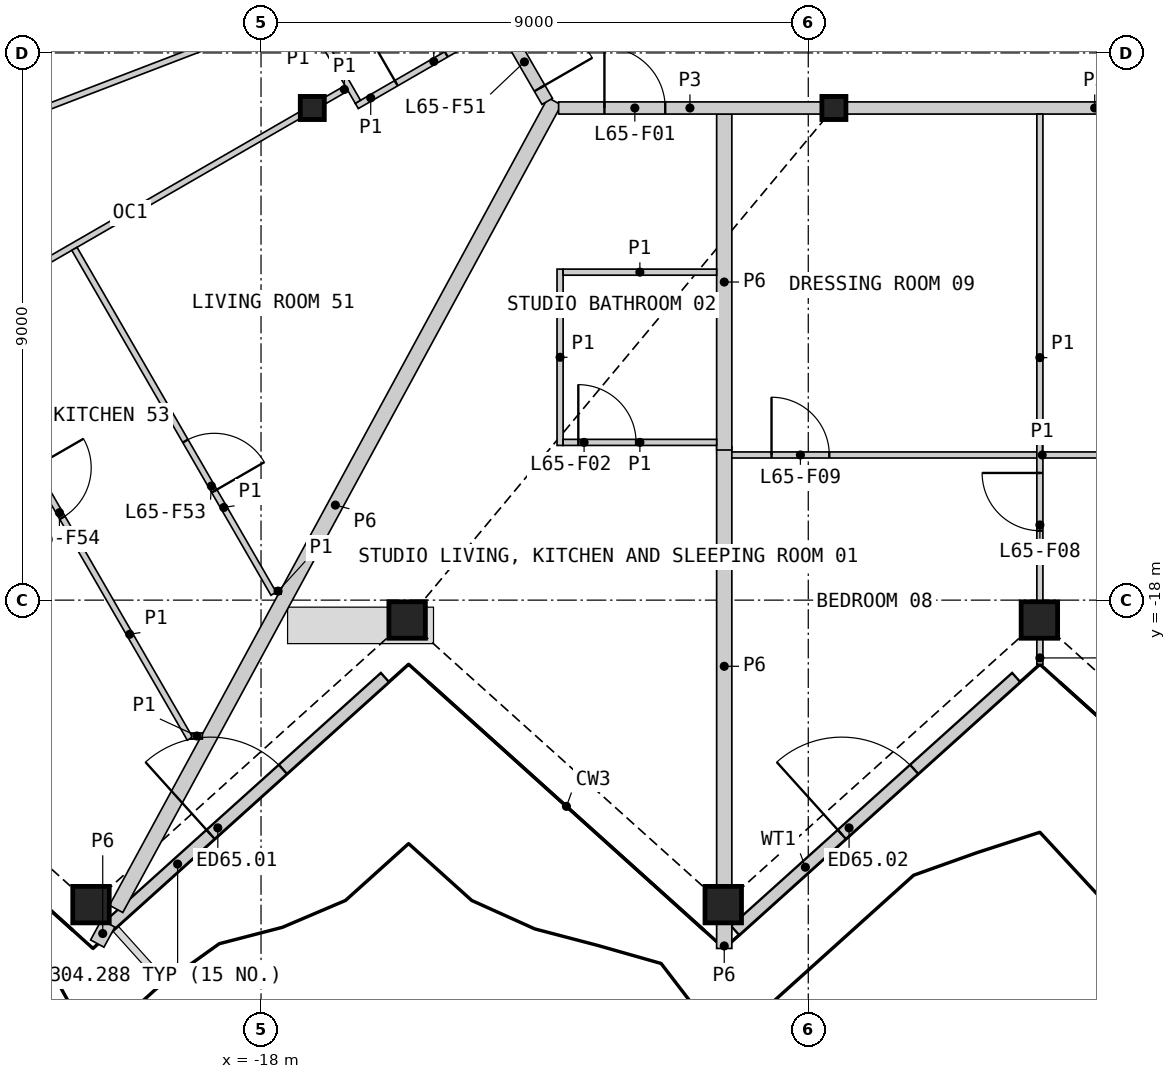
"""IFC4 building model, lengths in metres.
Left out: names, types, materials, properties, quantities, classifications, styles, units other than length and angle.
Written with IfcOpenShell. Run it as: python <this file> out.ifc"""

import sys

from ifc_helpers import new_model, si_unit, direction, frame, frame_2d, origin, origin_2d, place, context, subcontext, project, spatial, rectangle, hollow_rectangle, i_section, extrude, element, fill, save


model = new_model("IFC4")
c1 = context("Model", 3, precision=1e-05, world=origin(), true_north=direction((0.0, 1.0)))
c2 = subcontext(c1, "Body", "Model", "MODEL_VIEW")
j1 = project(units=[si_unit("LENGTHUNIT", "METRE"), si_unit("PLANEANGLEUNIT", "RADIAN")], contexts=[c1])
p1 = place(None, origin())
s1 = spatial("IfcSite", under=j1, at=p1, CompositionType="ELEMENT")
p2 = place(p1, origin())
s2 = spatial("IfcBuilding", under=s1, at=p2, CompositionType="ELEMENT")
p3 = place(p2, frame((0.0, 0.0, 301.8)))
s3 = spatial("IfcBuildingStorey", under=s2, at=p3, CompositionType="ELEMENT", Elevation=301.8)
for number, where, z_axis, x_axis in (
    (1, (-20.796, -23.008, 0.0), (0.0, 0.0, 1.0), (1.0, 0.0, 0.0)),
    (2, (-15.597, -18.327, 0.0), (0.0, 0.0, 1.0), (1.0, 0.0, 0.0)),
    (3, (-10.398, -23.008, 0.0), (0.0, 0.0, 1.0), (1.0, 0.0, 0.0)),
    (4, (-5.199, -18.327, 0.0), (0.0, 0.0, 1.0), (1.0, 0.0, 0.0)),
):
    element("IfcColumn", number, at=place(p3, frame(where, z_axis=z_axis, x_axis=x_axis)), inside=s3, PredefinedType="COLUMN", context=c2, shape_type="SweptSolid", body=[
        extrude(hollow_rectangle(XDim=0.6, YDim=0.6, WallThickness=0.04, at=origin_2d()), origin(), (0.0, 0.0, 1.0), 3.4),
    ])
for number, where, z_axis, x_axis in (
    (5, (-17.157, -9.906, 0.0), (0.0, 0.0, 1.0), (1.0, 0.0, 0.0)),
    (6, (-8.578, -9.906, 0.0), (0.0, 0.0, 1.0), (1.0, 0.0, 0.0)),
):
    element("IfcColumn", number, at=place(p3, frame(where, z_axis=z_axis, x_axis=x_axis)), inside=s3, PredefinedType="COLUMN", context=c2, shape_type="SweptSolid", body=[
        extrude(i_section(OverallWidth=0.396, OverallDepth=0.381, WebThickness=0.019, FlangeThickness=0.03, at=origin_2d()), origin(), (0.0, 0.0, 1.0), 3.4),
    ])
p4 = place(p3, frame((-20.508, -23.364, 0.0), z_axis=(0.0, 0.0, 1.0), x_axis=(0.743135364919, 0.669141113224, 0.0)))
e7 = element("IfcWall", 7, at=p4, inside=s3, PredefinedType="SOLIDWALL", context=c2, shape_type="SweptSolid", body=[
    extrude(rectangle(XDim=6.117, YDim=0.2, at=frame_2d((3.059, 0.0))), origin(), (0.0, 0.0, 1.0), 2.488),
])
p5 = place(p4, frame((2.259, 0.0, 0.0)))
e8 = element("IfcOpeningElement", 8, at=p5, cuts=e7, PredefinedType="OPENING", context=c2, shape_type="SweptSolid", body=[
    extrude(rectangle(XDim=1.6, YDim=2.25, at=frame_2d((0.8, 1.125))), frame((0.0, 0.11, 0.0), z_axis=(0.0, -1.0, 0.0), x_axis=(1.0, 0.0, 0.0)), (0.0, 0.0, 1.0), 0.22),
])
p6 = place(p3, frame((-10.203, -23.434, 0.0), z_axis=(0.0, 0.0, 1.0), x_axis=(0.74314582041, 0.669129501373, 0.0)))
e9 = element("IfcWall", 9, at=p6, inside=s3, PredefinedType="SOLIDWALL", context=c2, shape_type="SweptSolid", body=[
    extrude(rectangle(XDim=6.221, YDim=0.2, at=frame_2d((3.11, 0.0))), origin(), (0.0, 0.0, 1.0), 2.488),
])
p7 = place(p6, frame((2.362, 0.0, 0.0)))
e10 = element("IfcOpeningElement", 10, at=p7, cuts=e9, PredefinedType="OPENING", context=c2, shape_type="SweptSolid", body=[
    extrude(rectangle(XDim=1.6, YDim=2.25, at=frame_2d((0.8, 1.125))), frame((0.0, 0.11, 0.0), z_axis=(0.0, -1.0, 0.0), x_axis=(1.0, 0.0, 0.0)), (0.0, 0.0, 1.0), 0.22),
])
p8 = place(p3, frame((-20.383, -23.078, 0.0), z_axis=(0.0, 0.0, 1.0), x_axis=(0.477177412766, 0.878806984921, 0.0)))
e11 = element("IfcWall", 11, at=p8, inside=s3, PredefinedType="PARTITIONING", context=c2, shape_type="SweptSolid", body=[
    extrude(rectangle(XDim=15.114, YDim=0.25, at=frame_2d((7.557, 0.0))), origin(), (0.0, 0.0, 1.0), 2.33),
])
p9 = place(p3, frame((-8.371, -9.906, 0.0), z_axis=(0.0, 0.0, 1.0), x_axis=(1.0, 0.0, 0.0)))
e12 = element("IfcWall", 12, at=p9, inside=s3, PredefinedType="PARTITIONING", context=c2, shape_type="SweptSolid", body=[
    extrude(rectangle(XDim=8.163, YDim=0.2, at=frame_2d((4.082, 0.0))), origin(), (0.0, 0.0, 1.0), 3.1),
])
p10 = place(p3, frame((-10.382, -22.698, 0.0), z_axis=(0.0, 0.0, 1.0), x_axis=(0.0, 1.0, 0.0)))
e13 = element("IfcWall", 13, at=p10, inside=s3, PredefinedType="PARTITIONING", context=c2, shape_type="SweptSolid", body=[
    extrude(rectangle(XDim=7.22, YDim=0.25, at=frame_2d((3.61, 0.0))), origin(), (0.0, 0.0, 1.0), 2.33),
])
p11 = place(p3, frame((-10.382, -15.531, 0.0), z_axis=(0.0, 0.0, 1.0), x_axis=(0.0, 1.0, 0.0)))
e14 = element("IfcWall", 14, at=p11, inside=s3, PredefinedType="PARTITIONING", context=c2, shape_type="SweptSolid", body=[
    extrude(rectangle(XDim=5.525, YDim=0.25, at=frame_2d((2.762, 0.0))), origin(), (0.0, 0.0, 1.0), 2.33),
])
p12 = place(p3, frame((-13.106, -9.906, 0.0), z_axis=(0.0, 0.0, 1.0), x_axis=(1.0, 0.0, 0.0)))
e15 = element("IfcWall", 15, at=p12, inside=s3, PredefinedType="PARTITIONING", context=c2, shape_type="SweptSolid", body=[
    extrude(rectangle(XDim=4.32, YDim=0.2, at=frame_2d((2.16, 0.0))), origin(), (0.0, 0.0, 1.0), 3.1),
])
p13 = place(p12, frame((0.753, 0.0, 0.0)))
e16 = element("IfcOpeningElement", 16, at=p13, cuts=e15, PredefinedType="OPENING", context=c2, shape_type="SweptSolid", body=[
    extrude(rectangle(XDim=1.0, YDim=2.1, at=frame_2d((0.5, 1.05))), frame((0.0, 0.11, 0.0), z_axis=(0.0, -1.0, 0.0), x_axis=(1.0, 0.0, 0.0)), (0.0, 0.0, 1.0), 0.22),
])
p14 = place(p3, frame((-15.131, -6.614, 0.0), z_axis=(0.0, 0.0, 1.0), x_axis=(0.499967746641, -0.866044024469, 0.0)))
e17 = element("IfcWall", 17, at=p14, inside=s3, PredefinedType="PARTITIONING", context=c2, shape_type="SweptSolid", body=[
    extrude(rectangle(XDim=3.676, YDim=0.2, at=frame_2d((1.838, 0.0))), origin(), (0.0, 0.0, 1.0), 3.1),
])
p15 = place(p14, frame((2.426, 0.0, 0.0)))
e18 = element("IfcOpeningElement", 18, at=p15, cuts=e17, PredefinedType="OPENING", context=c2, shape_type="SweptSolid", body=[
    extrude(rectangle(XDim=1.0, YDim=2.1, at=frame_2d((0.5, 1.05))), frame((0.0, 0.11, 0.0), z_axis=(0.0, -1.0, 0.0), x_axis=(1.0, 0.0, 0.0)), (0.0, 0.0, 1.0), 0.22),
])
p16 = place(p3, frame((-10.382, -23.729, 0.0), z_axis=(0.0, 0.0, 1.0), x_axis=(0.0, 1.0, 0.0)))
e19 = element("IfcWall", 19, at=p16, inside=s3, PredefinedType="PARTITIONING", context=c2, shape_type="SweptSolid", body=[
    extrude(rectangle(XDim=0.411, YDim=0.25, at=frame_2d((0.206, 0.0))), origin(), (0.0, 0.0, 1.0), 2.33),
])
p17 = place(p3, frame((-20.693, -23.649, 0.0), z_axis=(0.0, 0.0, 1.0), x_axis=(0.477077538769, 0.878861207474, 0.0)))
e20 = element("IfcWall", 20, at=p17, inside=s3, PredefinedType="PARTITIONING", context=c2, shape_type="SweptSolid", body=[
    extrude(rectangle(XDim=0.376, YDim=0.25, at=frame_2d((0.188, 0.0))), origin(), (0.0, 0.0, 1.0), 2.33),
])
p18 = place(p3, frame((-29.479, -12.95, 0.0), z_axis=(0.0, 0.0, 1.0), x_axis=(0.933581523131, 0.358365092703, 0.0)))
e21 = element("IfcWall", 21, at=p18, inside=s3, PredefinedType="PARTITIONING", context=c2, shape_type="SweptSolid", body=[
    extrude(rectangle(XDim=13.005, YDim=0.1, at=frame_2d((6.502, 0.0))), origin(), (0.0, 0.0, 1.0), 2.33),
])
p19 = place(p18, frame((4.771, 0.0, 0.0)))
e22 = element("IfcOpeningElement", 22, at=p19, cuts=e21, PredefinedType="OPENING", context=c2, shape_type="SweptSolid", body=[
    extrude(rectangle(XDim=0.95, YDim=2.1, at=frame_2d((0.475, 1.05))), frame((0.0, 0.06, 0.0), z_axis=(0.0, -1.0, 0.0), x_axis=(1.0, 0.0, 0.0)), (0.0, 0.0, 1.0), 0.12),
])
p20 = place(p3, frame((-27.122, -15.659, 0.0), z_axis=(0.0, 0.0, 1.0), x_axis=(0.866021046153, 0.500007547564, 0.0)))
e23 = element("IfcWall", 23, at=p20, inside=s3, PredefinedType="PARTITIONING", context=c2, shape_type="SweptSolid", body=[
    extrude(rectangle(XDim=11.267, YDim=0.1, at=frame_2d((5.634, 0.0))), origin(), (0.0, 0.0, 1.0), 2.33),
])
p21 = place(p20, frame((1.452, 0.0, 0.0)))
e24 = element("IfcOpeningElement", 24, at=p21, cuts=e23, PredefinedType="OPENING", context=c2, shape_type="SweptSolid", body=[
    extrude(rectangle(XDim=0.95, YDim=2.1, at=frame_2d((0.475, 1.05))), frame((0.0, 0.06, 0.0), z_axis=(0.0, -1.0, 0.0), x_axis=(1.0, 0.0, 0.0)), (0.0, 0.0, 1.0), 0.12),
])
p22 = place(p3, frame((-10.257, -15.613, 0.0), z_axis=(0.0, 0.0, 1.0), x_axis=(1.0, 0.0, 0.0)))
e25 = element("IfcWall", 25, at=p22, inside=s3, PredefinedType="PARTITIONING", context=c2, shape_type="SweptSolid", body=[
    extrude(rectangle(XDim=10.207, YDim=0.1, at=frame_2d((5.104, 0.0))), origin(), (0.0, 0.0, 1.0), 2.33),
])
p23 = place(p22, frame((8.403, 0.0, 0.0)))
e26 = element("IfcOpeningElement", 26, at=p23, cuts=e25, PredefinedType="OPENING", context=c2, shape_type="SweptSolid", body=[
    extrude(rectangle(XDim=0.95, YDim=2.1, at=frame_2d((0.475, 1.05))), frame((0.0, 0.06, 0.0), z_axis=(0.0, -1.0, 0.0), x_axis=(1.0, 0.0, 0.0)), (0.0, 0.0, 1.0), 0.12),
])
p24 = place(p22, frame((0.653, 0.0, 0.0)))
e27 = element("IfcOpeningElement", 27, at=p24, cuts=e25, PredefinedType="OPENING", context=c2, shape_type="SweptSolid", body=[
    extrude(rectangle(XDim=0.95, YDim=2.1, at=frame_2d((0.475, 1.05))), frame((0.0, 0.06, 0.0), z_axis=(0.0, -1.0, 0.0), x_axis=(1.0, 0.0, 0.0)), (0.0, 0.0, 1.0), 0.12),
])
p25 = place(p3, frame((-5.191, -18.017, 0.0), z_axis=(0.0, 0.0, 1.0), x_axis=(0.0, 1.0, 0.0)))
e28 = element("IfcWall", 28, at=p25, inside=s3, PredefinedType="PARTITIONING", context=c2, shape_type="SweptSolid", body=[
    extrude(rectangle(XDim=8.011, YDim=0.1, at=frame_2d((4.006, 0.0))), origin(), (0.0, 0.0, 1.0), 2.33),
])
p26 = place(p25, frame((1.158, 0.0, 0.0)))
e29 = element("IfcOpeningElement", 29, at=p26, cuts=e28, PredefinedType="OPENING", context=c2, shape_type="SweptSolid", body=[
    extrude(rectangle(XDim=0.95, YDim=2.1, at=frame_2d((0.475, 1.05))), frame((0.0, 0.06, 0.0), z_axis=(0.0, -1.0, 0.0), x_axis=(1.0, 0.0, 0.0)), (0.0, 0.0, 1.0), 0.12),
])
p27 = place(p3, frame((-23.133, -13.414, 0.0), z_axis=(0.0, 0.0, 1.0), x_axis=(0.500014841469, -0.866016834889, 0.0)))
e30 = element("IfcWall", 30, at=p27, inside=s3, PredefinedType="PARTITIONING", context=c2, shape_type="SweptSolid", body=[
    extrude(rectangle(XDim=7.927, YDim=0.1, at=frame_2d((3.963, 0.0))), origin(), (0.0, 0.0, 1.0), 2.33),
])
p28 = place(p27, frame((2.78, 0.0, 0.0)))
e31 = element("IfcOpeningElement", 31, at=p28, cuts=e30, PredefinedType="OPENING", context=c2, shape_type="SweptSolid", body=[
    extrude(rectangle(XDim=0.95, YDim=2.1, at=frame_2d((0.475, 1.05))), frame((0.0, 0.06, 0.0), z_axis=(0.0, -1.0, 0.0), x_axis=(1.0, 0.0, 0.0)), (0.0, 0.0, 1.0), 0.12),
])
p29 = place(p3, frame((-21.069, -12.222, 0.0), z_axis=(0.0, 0.0, 1.0), x_axis=(0.499991310556, -0.866030420579, 0.0)))
e32 = element("IfcWall", 32, at=p29, inside=s3, PredefinedType="PARTITIONING", context=c2, shape_type="SweptSolid", body=[
    extrude(rectangle(XDim=6.55, YDim=0.1, at=frame_2d((3.275, 0.0))), origin(), (0.0, 0.0, 1.0), 2.33),
])
p30 = place(p29, frame((3.65, 0.0, 0.0)))
e33 = element("IfcOpeningElement", 33, at=p30, cuts=e32, PredefinedType="OPENING", context=c2, shape_type="SweptSolid", body=[
    extrude(rectangle(XDim=0.95, YDim=2.1, at=frame_2d((0.475, 1.05))), frame((0.0, 0.06, 0.0), z_axis=(0.0, -1.0, 0.0), x_axis=(1.0, 0.0, 0.0)), (0.0, 0.0, 1.0), 0.12),
])
p31 = place(p3, frame((-13.082, -15.456, 0.0), z_axis=(0.0, 0.0, 1.0), x_axis=(0.0, 1.0, 0.0)))
e34 = element("IfcWall", 34, at=p31, inside=s3, PredefinedType="PARTITIONING", context=c2, shape_type="SweptSolid", body=[
    extrude(rectangle(XDim=2.9, YDim=0.1, at=frame_2d((1.45, 0.0))), origin(), (0.0, 0.0, 1.0), 2.33),
])
p32 = place(p3, frame((-16.426, -9.872, 0.0), z_axis=(0.0, 0.0, 1.0), x_axis=(0.866029095148, 0.499993606316, 0.0)))
e35 = element("IfcWall", 35, at=p32, inside=s3, PredefinedType="PARTITIONING", context=c2, shape_type="SweptSolid", body=[
    extrude(rectangle(XDim=2.65, YDim=0.1, at=frame_2d((1.325, 0.0))), origin(), (0.0, 0.0, 1.0), 2.33),
])
p33 = place(p32, frame((0.75, 0.0, 0.0)))
e36 = element("IfcOpeningElement", 36, at=p33, cuts=e35, PredefinedType="OPENING", context=c2, shape_type="SweptSolid", body=[
    extrude(rectangle(XDim=0.95, YDim=2.1, at=frame_2d((0.475, 1.05))), frame((0.0, 0.06, 0.0), z_axis=(0.0, -1.0, 0.0), x_axis=(1.0, 0.0, 0.0)), (0.0, 0.0, 1.0), 0.12),
])
p34 = place(p3, frame((-13.032, -12.606, 0.0), z_axis=(0.0, 0.0, 1.0), x_axis=(1.0, 0.0, 0.0)))
e37 = element("IfcWall", 37, at=p34, inside=s3, PredefinedType="PARTITIONING", context=c2, shape_type="SweptSolid", body=[
    extrude(rectangle(XDim=2.525, YDim=0.1, at=frame_2d((1.263, 0.0))), origin(), (0.0, 0.0, 1.0), 2.33),
])
p35 = place(p3, frame((-13.032, -15.406, 0.0), z_axis=(0.0, 0.0, 1.0), x_axis=(1.0, 0.0, 0.0)))
e38 = element("IfcWall", 38, at=p35, inside=s3, PredefinedType="PARTITIONING", context=c2, shape_type="SweptSolid", body=[
    extrude(rectangle(XDim=2.525, YDim=0.1, at=frame_2d((1.263, 0.0))), origin(), (0.0, 0.0, 1.0), 2.33),
])
p36 = place(p35, frame((0.25, 0.0, 0.0)))
e39 = element("IfcOpeningElement", 39, at=p36, cuts=e38, PredefinedType="OPENING", context=c2, shape_type="SweptSolid", body=[
    extrude(rectangle(XDim=0.95, YDim=2.1, at=frame_2d((0.475, 1.05))), frame((0.0, 0.06, 0.0), z_axis=(0.0, -1.0, 0.0), x_axis=(1.0, 0.0, 0.0)), (0.0, 0.0, 1.0), 0.12),
])
p37 = place(p3, frame((-17.507, -7.899, 0.0), z_axis=(0.0, 0.0, 1.0), x_axis=(0.499946605688, -0.86605622881, 0.0)))
e40 = element("IfcWall", 40, at=p37, inside=s3, PredefinedType="PARTITIONING", context=c2, shape_type="SweptSolid", body=[
    extrude(rectangle(XDim=2.2, YDim=0.1, at=frame_2d((1.1, 0.0))), origin(), (0.0, 0.0, 1.0), 2.33),
])
p38 = place(p3, frame((-16.949, -9.786, 0.0), z_axis=(0.0, 0.0, 1.0), x_axis=(0.866036909293, 0.499980071345, 0.0)))
e41 = element("IfcWall", 41, at=p38, inside=s3, PredefinedType="PARTITIONING", context=c2, shape_type="SweptSolid", body=[
    extrude(rectangle(XDim=0.41, YDim=0.1, at=frame_2d((0.205, 0.0))), origin(), (0.0, 0.0, 1.0), 2.33),
])
p39 = place(p3, frame((-5.191, -19.055, 0.0), z_axis=(0.0, 0.0, 1.0), x_axis=(0.0, 1.0, 0.0)))
e42 = element("IfcWall", 42, at=p39, inside=s3, PredefinedType="PARTITIONING", context=c2, shape_type="SweptSolid", body=[
    extrude(rectangle(XDim=0.418, YDim=0.1, at=frame_2d((0.209, 0.0))), origin(), (0.0, 0.0, 1.0), 2.33),
])
p40 = place(p3, frame((-19.145, -20.235, 0.0), z_axis=(0.0, 0.0, 1.0), x_axis=(1.0, 0.0, 0.0)))
e43 = element("IfcWall", 43, at=p40, inside=s3, PredefinedType="PARTITIONING", context=c2, shape_type="SweptSolid", body=[
    extrude(rectangle(XDim=0.18, YDim=0.1, at=frame_2d((0.09, 0.0))), origin(), (0.0, 0.0, 1.0), 2.33),
])
p41 = place(p3, frame((-17.769, -17.852, 0.0), z_axis=(0.0, 0.0, 1.0), x_axis=(1.0, 0.0, 0.0)))
e44 = element("IfcWall", 44, at=p41, inside=s3, PredefinedType="PARTITIONING", context=c2, shape_type="SweptSolid", body=[
    extrude(rectangle(XDim=0.098, YDim=0.1, at=frame_2d((0.049, 0.0))), origin(), (0.0, 0.0, 1.0), 2.33),
])
p42 = place(p5, origin())
e45 = element("IfcDoor", 45, at=p42, inside=s3, OperationType="DOUBLE_DOOR_SINGLE_SWING", PredefinedType="DOOR", context=c2, shape_type="SweptSolid", body=[
    extrude(rectangle(XDim=1.6, YDim=2.25, at=frame_2d((0.8, 1.125))), frame((0.0, 0.025, 0.0), z_axis=(0.0, -1.0, 0.0), x_axis=(1.0, 0.0, 0.0)), (0.0, 0.0, 1.0), 0.05),
])
fill(e8, e45)
p43 = place(p7, origin())
e46 = element("IfcDoor", 46, at=p43, inside=s3, OperationType="DOUBLE_DOOR_SINGLE_SWING", PredefinedType="DOOR", context=c2, shape_type="SweptSolid", body=[
    extrude(rectangle(XDim=1.6, YDim=2.25, at=frame_2d((0.8, 1.125))), frame((0.0, 0.025, 0.0), z_axis=(0.0, -1.0, 0.0), x_axis=(1.0, 0.0, 0.0)), (0.0, 0.0, 1.0), 0.05),
])
fill(e10, e46)
p44 = place(p13, origin())
e47 = element("IfcDoor", 47, at=p44, inside=s3, OperationType="SINGLE_SWING_LEFT", PredefinedType="DOOR", context=c2, shape_type="SweptSolid", body=[
    extrude(rectangle(XDim=1.0, YDim=2.1, at=frame_2d((0.5, 1.05))), frame((0.0, 0.025, 0.0), z_axis=(0.0, -1.0, 0.0), x_axis=(1.0, 0.0, 0.0)), (0.0, 0.0, 1.0), 0.05),
])
fill(e16, e47)
p45 = place(p36, origin())
e48 = element("IfcDoor", 48, at=p45, inside=s3, OperationType="SINGLE_SWING_LEFT", PredefinedType="DOOR", context=c2, shape_type="SweptSolid", body=[
    extrude(rectangle(XDim=0.95, YDim=2.1, at=frame_2d((0.475, 1.05))), frame((0.0, 0.025, 0.0), z_axis=(0.0, -1.0, 0.0), x_axis=(1.0, 0.0, 0.0)), (0.0, 0.0, 1.0), 0.05),
])
fill(e39, e48)
p46 = place(p26, origin())
e49 = element("IfcDoor", 49, at=p46, inside=s3, OperationType="SINGLE_SWING_RIGHT", PredefinedType="DOOR", context=c2, shape_type="SweptSolid", body=[
    extrude(rectangle(XDim=0.95, YDim=2.1, at=frame_2d((0.475, 1.05))), frame((0.0, 0.025, 0.0), z_axis=(0.0, -1.0, 0.0), x_axis=(1.0, 0.0, 0.0)), (0.0, 0.0, 1.0), 0.05),
])
fill(e29, e49)
p47 = place(p24, origin())
e50 = element("IfcDoor", 50, at=p47, inside=s3, OperationType="SINGLE_SWING_LEFT", PredefinedType="DOOR", context=c2, shape_type="SweptSolid", body=[
    extrude(rectangle(XDim=0.95, YDim=2.1, at=frame_2d((0.475, 1.05))), frame((0.0, 0.025, 0.0), z_axis=(0.0, -1.0, 0.0), x_axis=(1.0, 0.0, 0.0)), (0.0, 0.0, 1.0), 0.05),
])
fill(e27, e50)
p48 = place(p15, origin())
e51 = element("IfcDoor", 51, at=p48, inside=s3, OperationType="SINGLE_SWING_RIGHT", PredefinedType="DOOR", context=c2, shape_type="SweptSolid", body=[
    extrude(rectangle(XDim=1.0, YDim=2.1, at=frame_2d((0.5, 1.05))), frame((0.0, 0.025, 0.0), z_axis=(0.0, -1.0, 0.0), x_axis=(1.0, 0.0, 0.0)), (0.0, 0.0, 1.0), 0.05),
])
fill(e18, e51)
p49 = place(p33, origin())
e52 = element("IfcDoor", 52, at=p49, inside=s3, OperationType="SINGLE_SWING_LEFT", PredefinedType="DOOR", context=c2, shape_type="SweptSolid", body=[
    extrude(rectangle(XDim=0.95, YDim=2.1, at=frame_2d((0.475, 1.05))), frame((0.0, 0.025, 0.0), z_axis=(0.0, -1.0, 0.0), x_axis=(1.0, 0.0, 0.0)), (0.0, 0.0, 1.0), 0.05),
])
fill(e36, e52)
p50 = place(p30, origin())
e53 = element("IfcDoor", 53, at=p50, inside=s3, OperationType="SINGLE_SWING_RIGHT", PredefinedType="DOOR", context=c2, shape_type="SweptSolid", body=[
    extrude(rectangle(XDim=0.95, YDim=2.1, at=frame_2d((0.475, 1.05))), frame((0.0, 0.025, 0.0), z_axis=(0.0, -1.0, 0.0), x_axis=(1.0, 0.0, 0.0)), (0.0, 0.0, 1.0), 0.05),
])
fill(e33, e53)
p51 = place(p28, origin())
e54 = element("IfcDoor", 54, at=p51, inside=s3, OperationType="SINGLE_SWING_LEFT", PredefinedType="DOOR", context=c2, shape_type="SweptSolid", body=[
    extrude(rectangle(XDim=0.95, YDim=2.1, at=frame_2d((0.475, 1.05))), frame((0.0, 0.025, 0.0), z_axis=(0.0, -1.0, 0.0), x_axis=(1.0, 0.0, 0.0)), (0.0, 0.0, 1.0), 0.05),
])
fill(e31, e54)
save(model, sys.argv[1])
